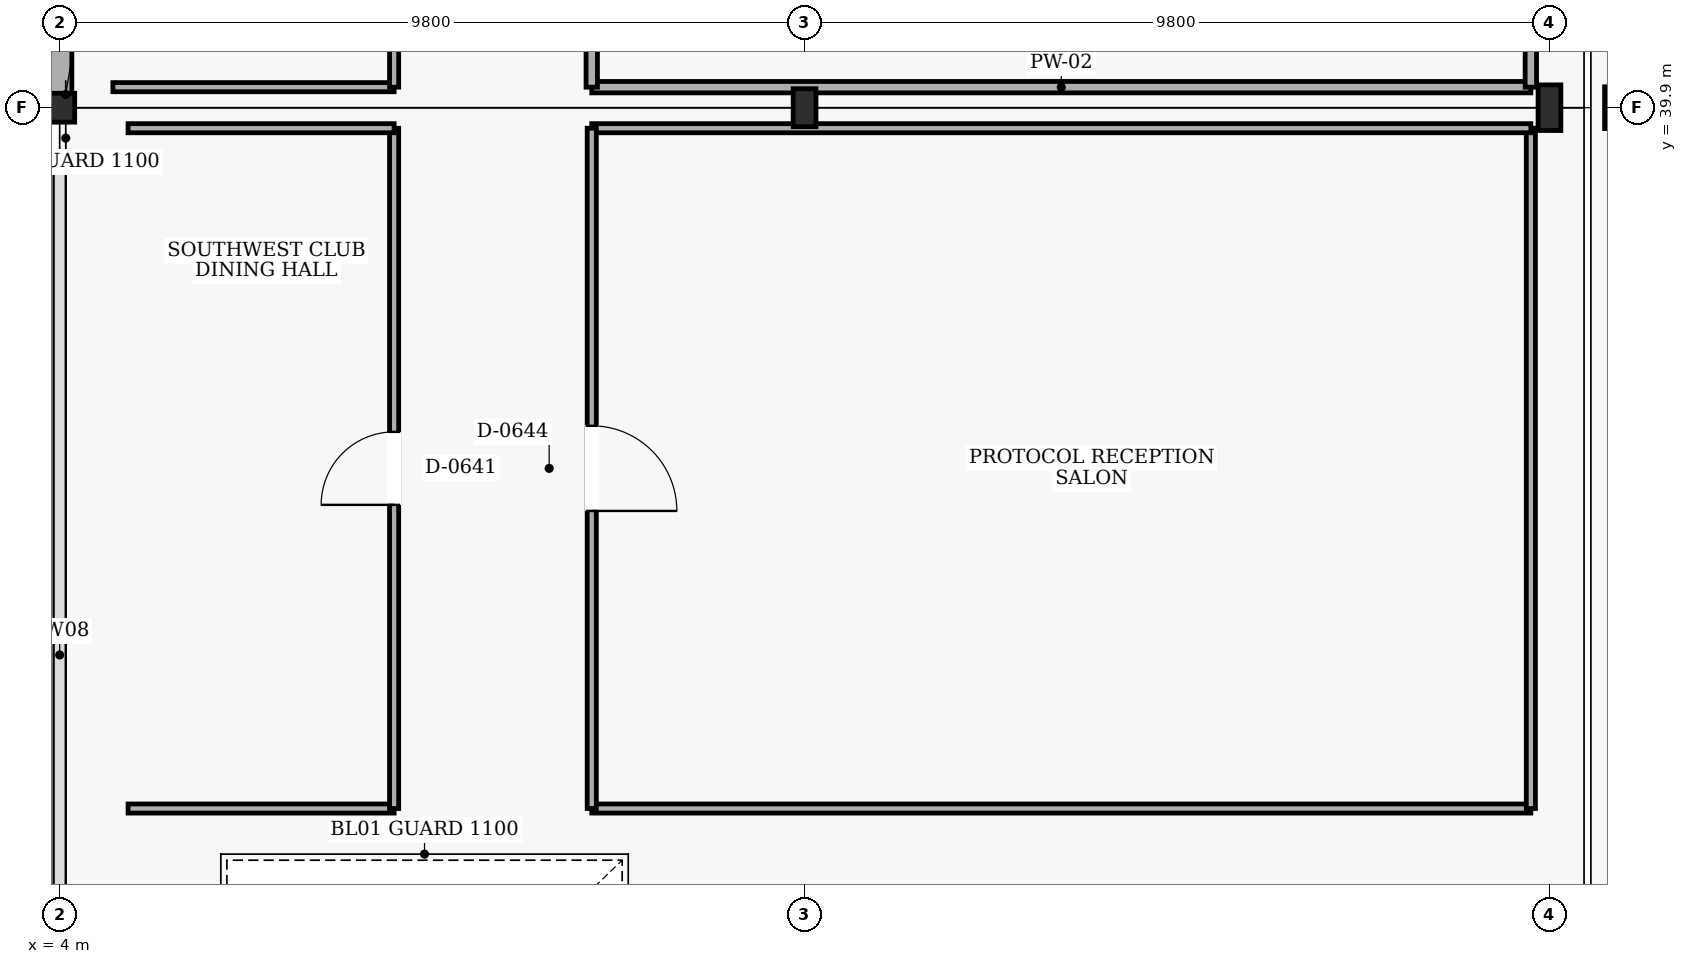
"""IFC4 building model, lengths in metres.
Left out: names, types, materials, properties, quantities, classifications, styles, units other than length and angle.
Written with IfcOpenShell. Run it as: python <this file> out.ifc"""

import sys

from ifc_helpers import new_model, si_unit, direction, frame, frame_2d, origin, origin_2d, place, context, subcontext, project, spatial, rectangle, i_section, extrude, element, fill, save


model = new_model("IFC4")
c1 = context("Model", 3, precision=1e-05, world=origin(), true_north=direction((0.0, 1.0)))
c2 = subcontext(c1, "Body", "Model", "MODEL_VIEW")
j1 = project(units=[si_unit("LENGTHUNIT", "METRE"), si_unit("PLANEANGLEUNIT", "RADIAN")], contexts=[c1])
p1 = place(None, origin())
s1 = spatial("IfcSite", under=j1, at=p1, CompositionType="ELEMENT")
p2 = place(p1, origin())
s2 = spatial("IfcBuilding", under=s1, at=p2, CompositionType="ELEMENT")
p3 = place(p2, frame((0.0, 0.0, 10.2)))
s3 = spatial("IfcBuildingStorey", under=s2, at=p3, CompositionType="ELEMENT", Elevation=10.2)
p4 = place(p3, frame((4.0, 39.9, 0.0), z_axis=(0.0, 0.0, 1.0), x_axis=(1.0, 0.0, 0.0)))
e1 = element("IfcColumn", 1, at=p4, inside=s3, PredefinedType="COLUMN", context=c2, shape_type="SweptSolid", body=[
    extrude(i_section(OverallWidth=0.395, OverallDepth=0.38, WebThickness=0.019, FlangeThickness=0.03, at=origin_2d()), origin(), (0.0, 0.0, 1.0), 4.8),
])
p5 = place(p3, frame((13.8, 39.9, 0.0), z_axis=(0.0, 0.0, 1.0), x_axis=(1.0, 0.0, 0.0)))
e2 = element("IfcColumn", 2, at=p5, inside=s3, PredefinedType="COLUMN", context=c2, shape_type="SweptSolid", body=[
    extrude(i_section(OverallWidth=0.3, OverallDepth=0.5, WebThickness=0.014, FlangeThickness=0.028, at=origin_2d()), origin(), (0.0, 0.0, 1.0), 4.8),
])
p6 = place(p3, frame((23.6, 39.9, 0.0), z_axis=(0.0, 0.0, 1.0), x_axis=(1.0, 0.0, 0.0)))
e3 = element("IfcColumn", 3, at=p6, inside=s3, PredefinedType="COLUMN", context=c2, shape_type="SweptSolid", body=[
    extrude(i_section(OverallWidth=0.3, OverallDepth=0.6, WebThickness=0.015, FlangeThickness=0.03, at=origin_2d()), origin(), (0.0, 0.0, 1.0), 4.8),
])
p7 = place(p3, frame((24.6, 39.9, 0.0), z_axis=(0.0, 0.0, 1.0), x_axis=(1.0, 0.0, 0.0)))
e4 = element("IfcColumn", 4, at=p7, inside=s3, PredefinedType="COLUMN", context=c2, shape_type="SweptSolid", body=[
    extrude(rectangle(XDim=0.55, YDim=0.55, at=origin_2d()), origin(), (0.0, 0.0, 1.0), 4.8),
])
p8 = place(p3, frame((4.0, 40.085, 0.0), z_axis=(0.0, 0.0, 1.0), x_axis=(0.0, 1.0, 0.0)))
e5 = element("IfcWall", 5, at=p8, inside=s3, PredefinedType="SOLIDWALL", context=c2, shape_type="SweptSolid", body=[
    extrude(rectangle(XDim=6.77, YDim=0.32, at=frame_2d((3.385, 0.0))), origin(), (0.0, 0.0, 1.0), 3.72),
])
p9 = place(p8, frame((2.085, 0.0, 0.9)))
e6 = element("IfcOpeningElement", 6, at=p9, cuts=e5, PredefinedType="OPENING", context=c2, shape_type="SweptSolid", body=[
    extrude(rectangle(XDim=2.6, YDim=2.1, at=frame_2d((1.3, 1.05))), frame((0.0, 0.17, 0.0), z_axis=(0.0, -1.0, 0.0), x_axis=(1.0, 0.0, 0.0)), (0.0, 0.0, 1.0), 0.34),
])
p10 = place(p3, frame((4.9, 30.68, 0.0), z_axis=(0.0, 0.0, 1.0), x_axis=(1.0, 0.0, 0.0)))
e7 = element("IfcWall", 7, at=p10, inside=s3, PredefinedType="PARTITIONING", context=c2, shape_type="SweptSolid", body=[
    extrude(rectangle(XDim=3.5, YDim=0.12, at=frame_2d((1.75, 0.0))), origin(), (0.0, 0.0, 1.0), 4.48),
])
p11 = place(p3, frame((8.4, 30.68, 0.0), z_axis=(0.0, 0.0, 1.0), x_axis=(0.0, 1.0, 0.0)))
e8 = element("IfcWall", 8, at=p11, inside=s3, PredefinedType="PARTITIONING", context=c2, shape_type="SweptSolid", body=[
    extrude(rectangle(XDim=8.95, YDim=0.12, at=frame_2d((4.475, 0.0))), origin(), (0.0, 0.0, 1.0), 4.48),
])
p12 = place(p11, frame((3.995, 0.0, 0.0)))
e9 = element("IfcOpeningElement", 9, at=p12, cuts=e8, PredefinedType="OPENING", context=c2, shape_type="SweptSolid", body=[
    extrude(rectangle(XDim=0.96, YDim=2.1, at=frame_2d((0.48, 1.05))), frame((0.0, 0.07, 0.0), z_axis=(0.0, -1.0, 0.0), x_axis=(1.0, 0.0, 0.0)), (0.0, 0.0, 1.0), 0.14),
])
p13 = place(p3, frame((8.4, 39.63, 0.0), z_axis=(0.0, 0.0, 1.0), x_axis=(-1.0, 0.0, 0.0)))
e10 = element("IfcWall", 10, at=p13, inside=s3, PredefinedType="PARTITIONING", context=c2, shape_type="SweptSolid", body=[
    extrude(rectangle(XDim=3.5, YDim=0.12, at=frame_2d((1.75, 0.0))), origin(), (0.0, 0.0, 1.0), 3.82),
])
p14 = place(p3, frame((11.0, 30.68, 0.0), z_axis=(0.0, 0.0, 1.0), x_axis=(1.0, 0.0, 0.0)))
e11 = element("IfcWall", 11, at=p14, inside=s3, PredefinedType="PARTITIONING", context=c2, shape_type="SweptSolid", body=[
    extrude(rectangle(XDim=12.355, YDim=0.12, at=frame_2d((6.177, 0.0))), origin(), (0.0, 0.0, 1.0), 4.48),
])
p15 = place(p3, frame((23.355, 30.68, 0.0), z_axis=(0.0, 0.0, 1.0), x_axis=(0.0, 1.0, 0.0)))
e12 = element("IfcWall", 12, at=p15, inside=s3, PredefinedType="PARTITIONING", context=c2, shape_type="SweptSolid", body=[
    extrude(rectangle(XDim=8.95, YDim=0.12, at=frame_2d((4.475, 0.0))), origin(), (0.0, 0.0, 1.0), 3.97),
])
p16 = place(p3, frame((23.355, 39.63, 0.0), z_axis=(0.0, 0.0, 1.0), x_axis=(-1.0, 0.0, 0.0)))
e13 = element("IfcWall", 13, at=p16, inside=s3, PredefinedType="PARTITIONING", context=c2, shape_type="SweptSolid", body=[
    extrude(rectangle(XDim=12.355, YDim=0.12, at=frame_2d((6.177, 0.0))), origin(), (0.0, 0.0, 1.0), 3.82),
])
p17 = place(p3, frame((11.0, 39.63, 0.0), z_axis=(0.0, 0.0, 1.0), x_axis=(0.0, -1.0, 0.0)))
e14 = element("IfcWall", 14, at=p17, inside=s3, PredefinedType="PARTITIONING", context=c2, shape_type="SweptSolid", body=[
    extrude(rectangle(XDim=8.95, YDim=0.12, at=frame_2d((4.475, 0.0))), origin(), (0.0, 0.0, 1.0), 4.48),
])
p18 = place(p17, frame((3.915, 0.0, 0.0)))
e15 = element("IfcOpeningElement", 15, at=p18, cuts=e14, PredefinedType="OPENING", context=c2, shape_type="SweptSolid", body=[
    extrude(rectangle(XDim=1.12, YDim=2.15, at=frame_2d((0.56, 1.075))), frame((0.0, 0.07, 0.0), z_axis=(0.0, -1.0, 0.0), x_axis=(1.0, 0.0, 0.0)), (0.0, 0.0, 1.0), 0.14),
])
p19 = place(p3, frame((4.7, 40.17, 0.0), z_axis=(0.0, 0.0, 1.0), x_axis=(1.0, 0.0, 0.0)))
e16 = element("IfcWall", 16, at=p19, inside=s3, PredefinedType="PARTITIONING", context=c2, shape_type="SweptSolid", body=[
    extrude(rectangle(XDim=3.7, YDim=0.12, at=frame_2d((1.85, 0.0))), origin(), (0.0, 0.0, 1.0), 3.82),
])
p20 = place(p3, frame((8.4, 40.17, 0.0), z_axis=(0.0, 0.0, 1.0), x_axis=(0.0, 1.0, 0.0)))
e17 = element("IfcWall", 17, at=p20, inside=s3, PredefinedType="PARTITIONING", context=c2, shape_type="SweptSolid", body=[
    extrude(rectangle(XDim=17.318, YDim=0.12, at=frame_2d((8.659, 0.0))), origin(), (0.0, 0.0, 1.0), 4.48),
])
p21 = place(p20, frame((8.059, 0.0, 0.0)))
e18 = element("IfcOpeningElement", 18, at=p21, cuts=e17, PredefinedType="OPENING", context=c2, shape_type="SweptSolid", body=[
    extrude(rectangle(XDim=1.2, YDim=2.15, at=frame_2d((0.6, 1.075))), frame((0.0, 0.07, 0.0), z_axis=(0.0, -1.0, 0.0), x_axis=(1.0, 0.0, 0.0)), (0.0, 0.0, 1.0), 0.14),
])
p22 = place(p3, frame((11.0, 40.17, 0.0), z_axis=(0.0, 0.0, 1.0), x_axis=(1.0, 0.0, 0.0)))
e19 = element("IfcWall", 19, at=p22, inside=s3, PredefinedType="PARTITIONING", context=c2, shape_type="SweptSolid", body=[
    extrude(rectangle(XDim=12.355, YDim=0.15, at=frame_2d((6.177, 0.0))), origin(), (0.0, 0.0, 1.0), 3.82),
])
p23 = place(p3, frame((23.355, 40.17, 0.0), z_axis=(0.0, 0.0, 1.0), x_axis=(0.0, 1.0, 0.0)))
e20 = element("IfcWall", 20, at=p23, inside=s3, PredefinedType="PARTITIONING", context=c2, shape_type="SweptSolid", body=[
    extrude(rectangle(XDim=11.445, YDim=0.15, at=frame_2d((5.723, 0.0))), origin(), (0.0, 0.0, 1.0), 3.72),
])
p24 = place(p3, frame((11.0, 51.615, 0.0), z_axis=(0.0, 0.0, 1.0), x_axis=(0.0, -1.0, 0.0)))
e21 = element("IfcWall", 21, at=p24, inside=s3, PredefinedType="PARTITIONING", context=c2, shape_type="SweptSolid", body=[
    extrude(rectangle(XDim=11.445, YDim=0.15, at=frame_2d((5.723, 0.0))), origin(), (0.0, 0.0, 1.0), 4.48),
])
p25 = place(p24, frame((5.022, 0.0, 0.0)))
e22 = element("IfcOpeningElement", 22, at=p25, cuts=e21, PredefinedType="OPENING", context=c2, shape_type="SweptSolid", body=[
    extrude(rectangle(XDim=1.4, YDim=2.2, at=frame_2d((0.7, 1.1))), frame((0.0, 0.085, 0.0), z_axis=(0.0, -1.0, 0.0), x_axis=(1.0, 0.0, 0.0)), (0.0, 0.0, 1.0), 0.17),
])
p26 = place(p12, origin())
e23 = element("IfcDoor", 23, at=p26, inside=s3, OperationType="SINGLE_SWING_LEFT", PredefinedType="DOOR", context=c2, shape_type="SweptSolid", body=[
    extrude(rectangle(XDim=0.96, YDim=2.1, at=frame_2d((0.48, 1.05))), frame((0.0, 0.025, 0.0), z_axis=(0.0, -1.0, 0.0), x_axis=(1.0, 0.0, 0.0)), (0.0, 0.0, 1.0), 0.05),
])
fill(e9, e23)
p27 = place(p18, origin())
e24 = element("IfcDoor", 24, at=p27, inside=s3, OperationType="SINGLE_SWING_RIGHT", PredefinedType="DOOR", context=c2, shape_type="SweptSolid", body=[
    extrude(rectangle(XDim=1.12, YDim=2.15, at=frame_2d((0.56, 1.075))), frame((0.0, 0.025, 0.0), z_axis=(0.0, -1.0, 0.0), x_axis=(1.0, 0.0, 0.0)), (0.0, 0.0, 1.0), 0.05),
])
fill(e15, e24)
save(model, sys.argv[1])
